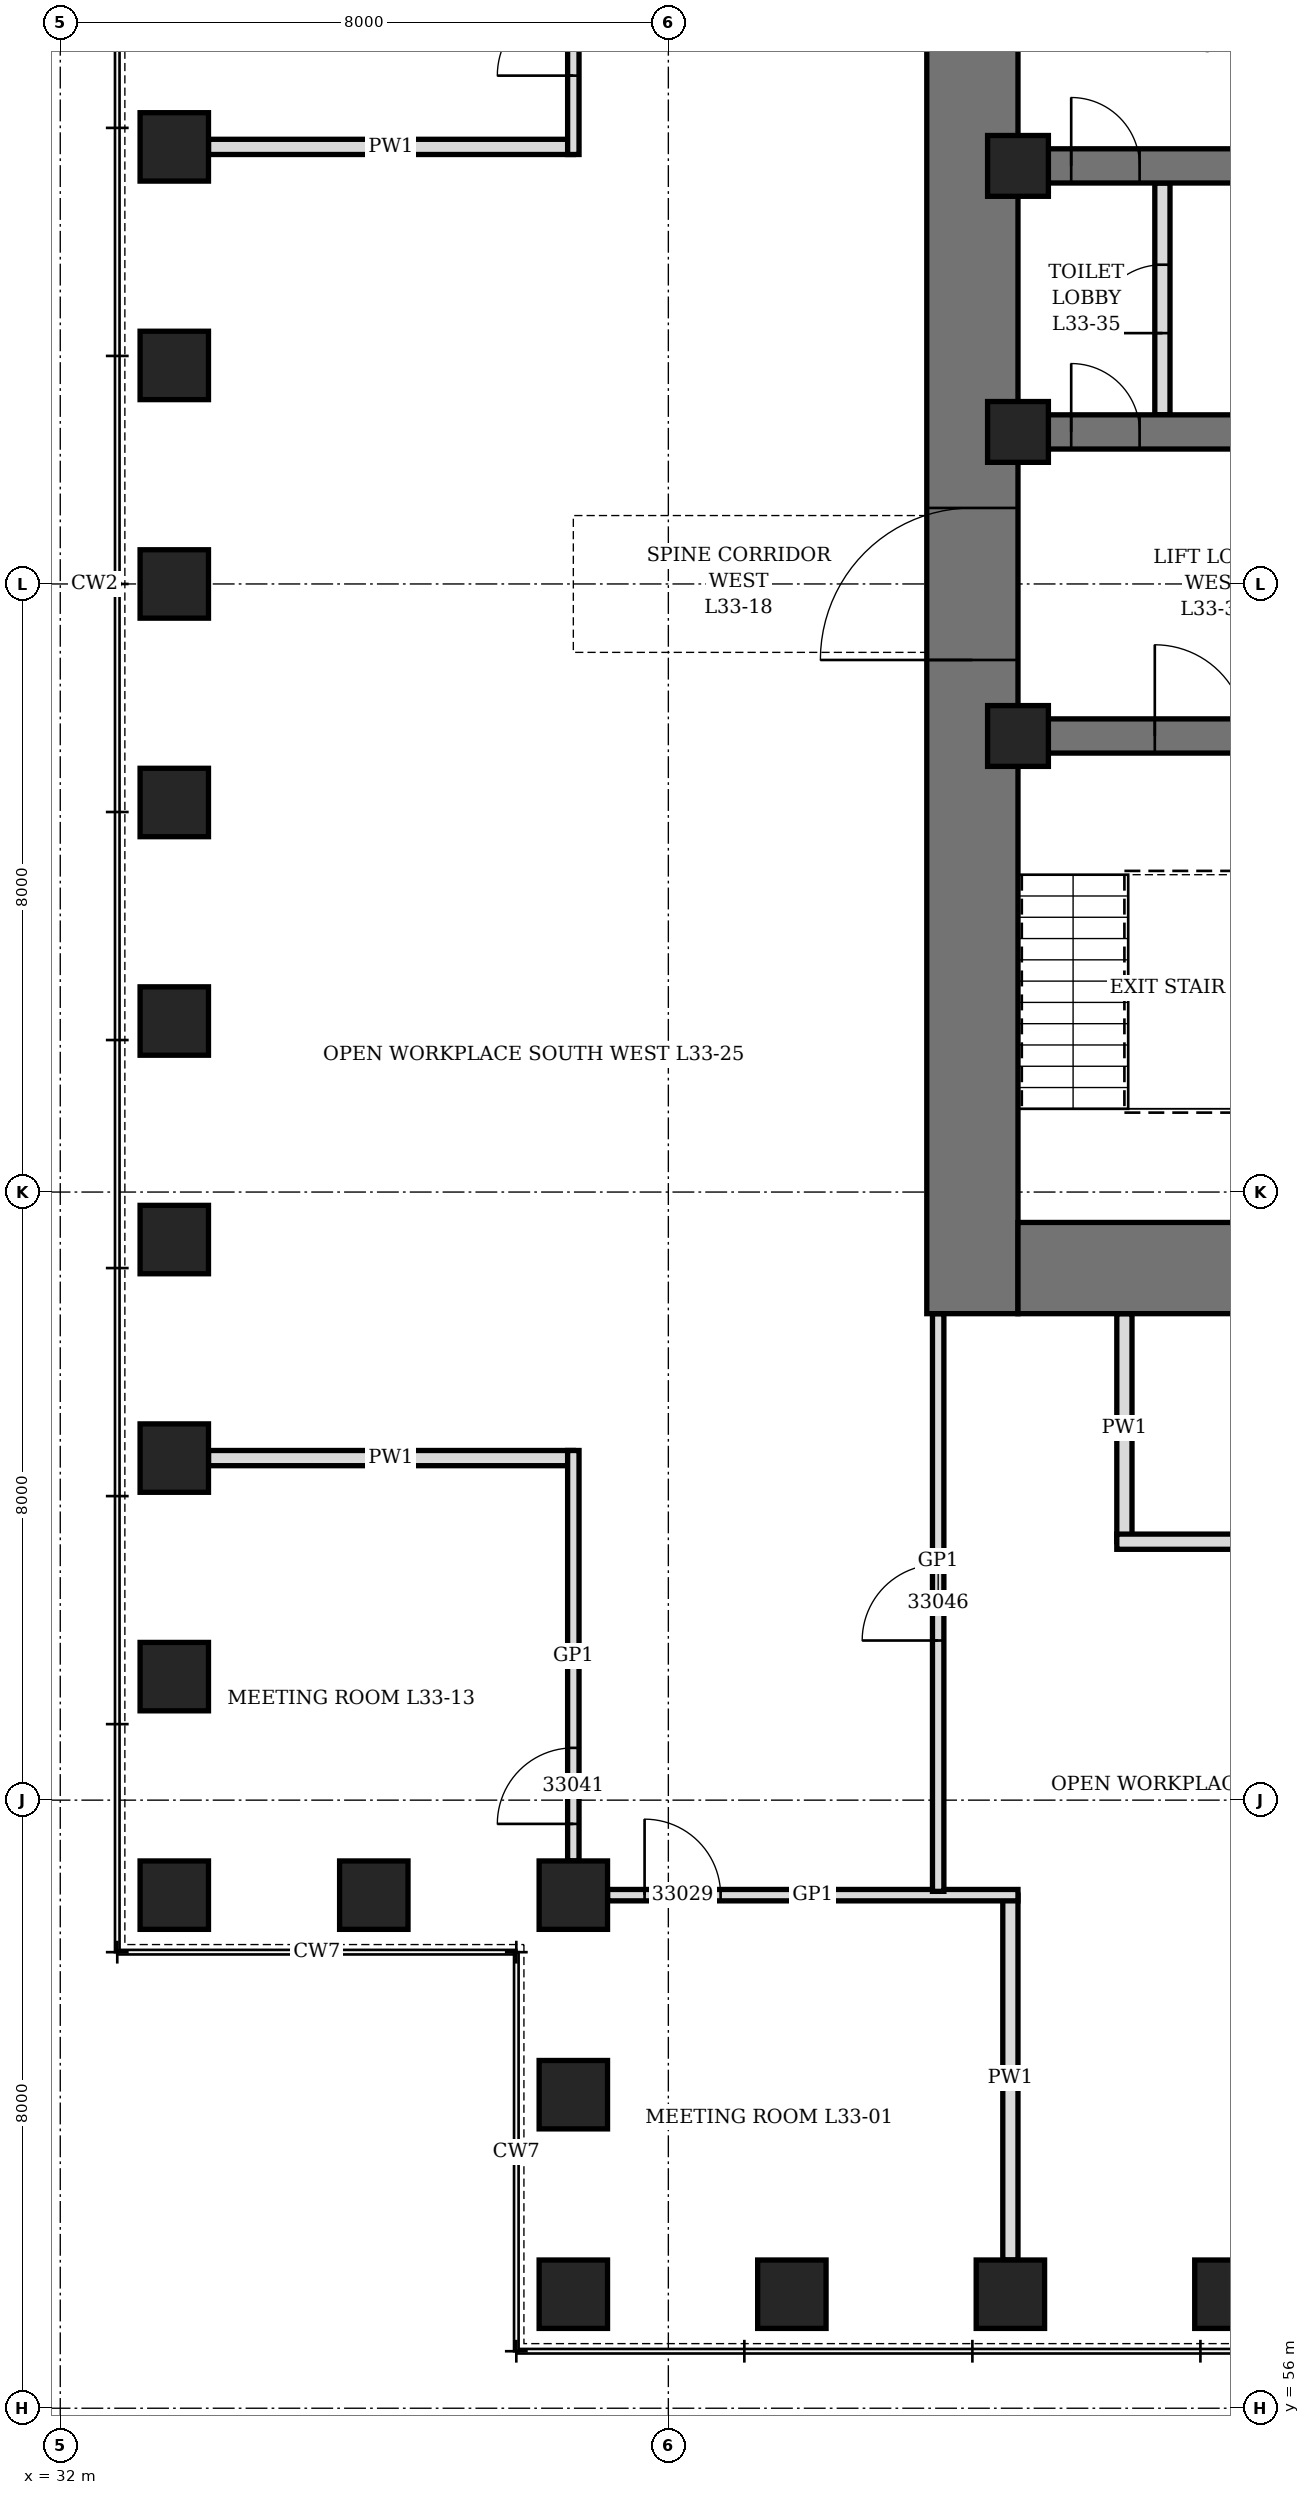
"""IFC4 building model, lengths in metres.
Left out: names, types, materials, properties, quantities, classifications, styles, units other than length and angle.
Written with IfcOpenShell. Run it as: python <this file> out.ifc"""

import sys

from ifc_helpers import new_model, si_unit, direction, frame, frame_2d, origin, origin_2d, place, context, subcontext, project, spatial, rectangle, hollow_rectangle, extrude, element, fill, save


model = new_model("IFC4")
c1 = context("Model", 3, precision=1e-05, world=origin(), true_north=direction((0.0, 1.0)))
c2 = subcontext(c1, "Body", "Model", "MODEL_VIEW")
j1 = project(units=[si_unit("LENGTHUNIT", "METRE"), si_unit("PLANEANGLEUNIT", "RADIAN")], contexts=[c1])
p1 = place(None, origin())
s1 = spatial("IfcSite", under=j1, at=p1, CompositionType="ELEMENT")
p2 = place(p1, origin())
s2 = spatial("IfcBuilding", under=s1, at=p2, CompositionType="ELEMENT")
p3 = place(p2, frame((0.0, 0.0, 150.1)))
s3 = spatial("IfcBuildingStorey", under=s2, at=p3, CompositionType="ELEMENT", Elevation=150.1)
for number, where, z_axis, x_axis in (
    (1, (38.75, 57.5, 0.0), (0.0, 0.0, 1.0), (1.0, 0.0, 0.0)),
    (2, (41.625, 57.5, 0.0), (0.0, 0.0, 1.0), (1.0, 0.0, 0.0)),
    (3, (44.5, 57.5, 0.0), (0.0, 0.0, 1.0), (1.0, 0.0, 0.0)),
    (4, (47.375, 57.5, 0.0), (0.0, 0.0, 1.0), (1.0, 0.0, 0.0)),
    (5, (33.5, 85.75, 0.0), (0.0, 0.0, 1.0), (0.0, 1.0, 0.0)),
    (6, (33.5, 82.875, 0.0), (0.0, 0.0, 1.0), (0.0, 1.0, 0.0)),
    (7, (33.5, 80.0, 0.0), (0.0, 0.0, 1.0), (0.0, 1.0, 0.0)),
    (8, (33.5, 77.125, 0.0), (0.0, 0.0, 1.0), (0.0, 1.0, 0.0)),
    (9, (33.5, 74.25, 0.0), (0.0, 0.0, 1.0), (0.0, 1.0, 0.0)),
    (10, (33.5, 71.375, 0.0), (0.0, 0.0, 1.0), (0.0, 1.0, 0.0)),
    (11, (33.5, 68.5, 0.0), (0.0, 0.0, 1.0), (0.0, 1.0, 0.0)),
    (12, (33.5, 65.625, 0.0), (0.0, 0.0, 1.0), (0.0, 1.0, 0.0)),
    (13, (33.5, 62.75, 0.0), (0.0, 0.0, 1.0), (1.0, 0.0, 0.0)),
    (14, (36.125, 62.75, 0.0), (0.0, 0.0, 1.0), (1.0, 0.0, 0.0)),
    (15, (38.75, 62.75, 0.0), (0.0, 0.0, 1.0), (0.0, 1.0, 0.0)),
    (16, (38.75, 60.125, 0.0), (0.0, 0.0, 1.0), (0.0, 1.0, 0.0)),
):
    element("IfcColumn", number, at=place(p3, frame(where, z_axis=z_axis, x_axis=x_axis)), inside=s3, PredefinedType="COLUMN", context=c2, shape_type="SweptSolid", body=[
        extrude(hollow_rectangle(XDim=0.9, YDim=0.9, WallThickness=0.12, at=origin_2d()), origin(), (0.0, 0.0, 1.0), 4.2),
    ])
p4 = place(p3, frame((44.0, 70.4, 0.0), z_axis=(0.0, 0.0, 1.0), x_axis=(0.0, 1.0, 0.0)))
e17 = element("IfcWall", 17, at=p4, inside=s3, PredefinedType="SHEAR", context=c2, shape_type="SweptSolid", body=[
    extrude(rectangle(XDim=19.2, YDim=1.2, at=frame_2d((9.6, 0.0))), origin(), (0.0, 0.0, 1.0), 4.2),
])
p5 = place(p4, frame((8.6, 0.0, 0.0)))
e18 = element("IfcOpeningElement", 18, at=p5, cuts=e17, PredefinedType="OPENING", context=c2, shape_type="SweptSolid", body=[
    extrude(rectangle(XDim=2.0, YDim=2.4, at=frame_2d((1.0, 1.2))), frame((0.0, 0.61, 0.0), z_axis=(0.0, -1.0, 0.0), x_axis=(1.0, 0.0, 0.0)), (0.0, 0.0, 1.0), 1.22),
])
p6 = place(p3, frame((44.6, 71.0, 0.0), z_axis=(0.0, 0.0, 1.0), x_axis=(1.0, 0.0, 0.0)))
e19 = element("IfcWall", 19, at=p6, inside=s3, PredefinedType="SHEAR", context=c2, shape_type="SweptSolid", body=[
    extrude(rectangle(XDim=22.8, YDim=1.2, at=frame_2d((11.4, 0.0))), origin(), (0.0, 0.0, 1.0), 4.2),
])
p7 = place(p3, frame((44.6, 78.0, 0.0), z_axis=(0.0, 0.0, 1.0), x_axis=(1.0, 0.0, 0.0)))
e20 = element("IfcWall", 20, at=p7, inside=s3, PredefinedType="SHEAR", context=c2, shape_type="SweptSolid", body=[
    extrude(rectangle(XDim=5.175, YDim=0.45, at=frame_2d((2.587, 0.0))), origin(), (0.0, 0.0, 1.0), 4.2),
])
p8 = place(p7, frame((1.8, 0.0, 0.0)))
e21 = element("IfcOpeningElement", 21, at=p8, cuts=e20, PredefinedType="OPENING", context=c2, shape_type="SweptSolid", body=[
    extrude(rectangle(XDim=1.2, YDim=2.1, at=frame_2d((0.6, 1.05))), frame((0.0, 0.235, 0.0), z_axis=(0.0, -1.0, 0.0), x_axis=(1.0, 0.0, 0.0)), (0.0, 0.0, 1.0), 0.47),
])
p9 = place(p3, frame((44.6, 82.0, 0.0), z_axis=(0.0, 0.0, 1.0), x_axis=(1.0, 0.0, 0.0)))
e22 = element("IfcWall", 22, at=p9, inside=s3, PredefinedType="SHEAR", context=c2, shape_type="SweptSolid", body=[
    extrude(rectangle(XDim=5.175, YDim=0.45, at=frame_2d((2.587, 0.0))), origin(), (0.0, 0.0, 1.0), 4.2),
])
p10 = place(p9, frame((0.7, 0.0, 0.0)))
e23 = element("IfcOpeningElement", 23, at=p10, cuts=e22, PredefinedType="OPENING", context=c2, shape_type="SweptSolid", body=[
    extrude(rectangle(XDim=0.9, YDim=2.1, at=frame_2d((0.45, 1.05))), frame((0.0, 0.235, 0.0), z_axis=(0.0, -1.0, 0.0), x_axis=(1.0, 0.0, 0.0)), (0.0, 0.0, 1.0), 0.47),
])
p11 = place(p3, frame((44.6, 85.5, 0.0), z_axis=(0.0, 0.0, 1.0), x_axis=(1.0, 0.0, 0.0)))
e24 = element("IfcWall", 24, at=p11, inside=s3, PredefinedType="SHEAR", context=c2, shape_type="SweptSolid", body=[
    extrude(rectangle(XDim=5.175, YDim=0.45, at=frame_2d((2.587, 0.0))), origin(), (0.0, 0.0, 1.0), 4.2),
])
p12 = place(p11, frame((0.7, 0.0, 0.0)))
e25 = element("IfcOpeningElement", 25, at=p12, cuts=e24, PredefinedType="OPENING", context=c2, shape_type="SweptSolid", body=[
    extrude(rectangle(XDim=0.9, YDim=2.1, at=frame_2d((0.45, 1.05))), frame((0.0, 0.235, 0.0), z_axis=(0.0, -1.0, 0.0), x_axis=(1.0, 0.0, 0.0)), (0.0, 0.0, 1.0), 0.47),
])
for number, where, z_axis, x_axis in (
    (26, (44.6, 78.0, 0.0), (0.0, 0.0, 1.0), (1.0, 0.0, 0.0)),
    (27, (44.6, 82.0, 0.0), (0.0, 0.0, 1.0), (1.0, 0.0, 0.0)),
    (28, (44.6, 85.5, 0.0), (0.0, 0.0, 1.0), (1.0, 0.0, 0.0)),
):
    element("IfcColumn", number, at=place(p3, frame(where, z_axis=z_axis, x_axis=x_axis)), inside=s3, PredefinedType="COLUMN", context=c2, shape_type="SweptSolid", body=[
        extrude(hollow_rectangle(XDim=0.8, YDim=0.8, WallThickness=0.1, at=origin_2d()), origin(), (0.0, 0.0, 1.0), 4.2),
    ])
p13 = place(p3, frame((46.5, 82.225, 0.0), z_axis=(0.0, 0.0, 1.0), x_axis=(0.0, 1.0, 0.0)))
e29 = element("IfcWall", 29, at=p13, inside=s3, PredefinedType="PARTITIONING", context=c2, shape_type="SweptSolid", body=[
    extrude(rectangle(XDim=3.05, YDim=0.2, at=frame_2d((1.525, 0.0))), origin(), (0.0, 0.0, 1.0), 4.04),
])
p14 = place(p13, frame((1.075, 0.0, 0.0)))
e30 = element("IfcOpeningElement", 30, at=p14, cuts=e29, PredefinedType="OPENING", context=c2, shape_type="SweptSolid", body=[
    extrude(rectangle(XDim=0.9, YDim=2.1, at=frame_2d((0.45, 1.05))), frame((0.0, 0.11, 0.0), z_axis=(0.0, -1.0, 0.0), x_axis=(1.0, 0.0, 0.0)), (0.0, 0.0, 1.0), 0.22),
])
p15 = place(p3, frame((44.5, 57.95, 0.0), z_axis=(0.0, 0.0, 1.0), x_axis=(0.0, 1.0, 0.0)))
e31 = element("IfcWall", 31, at=p15, inside=s3, PredefinedType="PARTITIONING", context=c2, shape_type="SweptSolid", body=[
    extrude(rectangle(XDim=4.8, YDim=0.2, at=frame_2d((2.4, 0.0))), origin(), (0.0, 0.0, 1.0), 2.74),
])
for number, where, z_axis, x_axis in (
    (32, (33.95, 68.5, 0.0), (0.0, 0.0, 1.0), (1.0, 0.0, 0.0)),
    (33, (33.95, 85.75, 0.0), (0.0, 0.0, 1.0), (1.0, 0.0, 0.0)),
):
    element("IfcWall", number, at=place(p3, frame(where, z_axis=z_axis, x_axis=x_axis)), inside=s3, PredefinedType="PARTITIONING", context=c2, shape_type="SweptSolid", body=[
        extrude(rectangle(XDim=4.8, YDim=0.2, at=frame_2d((2.4, 0.0))), origin(), (0.0, 0.0, 1.0), 3.428),
    ])
p16 = place(p3, frame((46.0, 67.4, 0.0), z_axis=(0.0, 0.0, 1.0), x_axis=(0.0, 1.0, 0.0)))
e34 = element("IfcWall", 34, at=p16, inside=s3, PredefinedType="PARTITIONING", context=c2, shape_type="SweptSolid", body=[
    extrude(rectangle(XDim=3.0, YDim=0.2, at=frame_2d((1.5, 0.0))), origin(), (0.0, 0.0, 1.0), 4.04),
])
p17 = place(p3, frame((39.2, 62.75, 0.0), z_axis=(0.0, 0.0, 1.0), x_axis=(1.0, 0.0, 0.0)))
e35 = element("IfcWall", 35, at=p17, inside=s3, PredefinedType="PARTITIONING", context=c2, shape_type="SweptSolid", body=[
    extrude(rectangle(XDim=5.4, YDim=0.15, at=frame_2d((2.7, 0.0))), origin(), (0.0, 0.0, 1.0), 4.04),
])
p18 = place(p17, frame((0.488, 0.0, 0.0)))
e36 = element("IfcOpeningElement", 36, at=p18, cuts=e35, PredefinedType="OPENING", context=c2, shape_type="SweptSolid", body=[
    extrude(rectangle(XDim=1.0, YDim=2.4, at=frame_2d((0.5, 1.2))), frame((0.0, 0.085, 0.0), z_axis=(0.0, -1.0, 0.0), x_axis=(1.0, 0.0, 0.0)), (0.0, 0.0, 1.0), 0.17),
])
p19 = place(p3, frame((45.9, 67.4, 0.0), z_axis=(0.0, 0.0, 1.0), x_axis=(1.0, 0.0, 0.0)))
e37 = element("IfcWall", 37, at=p19, inside=s3, PredefinedType="PARTITIONING", context=c2, shape_type="SweptSolid", body=[
    extrude(rectangle(XDim=6.2, YDim=0.2, at=frame_2d((3.1, 0.0))), origin(), (0.0, 0.0, 1.0), 4.04),
])
p20 = place(p19, frame((2.6, 0.0, 0.0)))
e38 = element("IfcOpeningElement", 38, at=p20, cuts=e37, PredefinedType="OPENING", context=c2, shape_type="SweptSolid", body=[
    extrude(rectangle(XDim=1.0, YDim=2.1, at=frame_2d((0.5, 1.05))), frame((0.0, 0.11, 0.0), z_axis=(0.0, -1.0, 0.0), x_axis=(1.0, 0.0, 0.0)), (0.0, 0.0, 1.0), 0.22),
])
p21 = place(p3, frame((38.75, 63.2, 0.0), z_axis=(0.0, 0.0, 1.0), x_axis=(0.0, 1.0, 0.0)))
e39 = element("IfcWall", 39, at=p21, inside=s3, PredefinedType="PARTITIONING", context=c2, shape_type="SweptSolid", body=[
    extrude(rectangle(XDim=5.4, YDim=0.15, at=frame_2d((2.7, 0.0))), origin(), (0.0, 0.0, 1.0), 4.04),
])
p22 = place(p21, frame((0.488, 0.0, 0.0)))
e40 = element("IfcOpeningElement", 40, at=p22, cuts=e39, PredefinedType="OPENING", context=c2, shape_type="SweptSolid", body=[
    extrude(rectangle(XDim=1.0, YDim=2.4, at=frame_2d((0.5, 1.2))), frame((0.0, 0.085, 0.0), z_axis=(0.0, -1.0, 0.0), x_axis=(1.0, 0.0, 0.0)), (0.0, 0.0, 1.0), 0.17),
])
p23 = place(p3, frame((38.75, 85.65, 0.0), z_axis=(0.0, 0.0, 1.0), x_axis=(0.0, 1.0, 0.0)))
e41 = element("IfcWall", 41, at=p23, inside=s3, PredefinedType="PARTITIONING", context=c2, shape_type="SweptSolid", body=[
    extrude(rectangle(XDim=11.15, YDim=0.15, at=frame_2d((5.575, 0.0))), origin(), (0.0, 0.0, 1.0), 4.04),
])
p24 = place(p23, frame((1.038, 0.0, 0.0)))
e42 = element("IfcOpeningElement", 42, at=p24, cuts=e41, PredefinedType="OPENING", context=c2, shape_type="SweptSolid", body=[
    extrude(rectangle(XDim=1.0, YDim=2.1, at=frame_2d((0.5, 1.05))), frame((0.0, 0.085, 0.0), z_axis=(0.0, -1.0, 0.0), x_axis=(1.0, 0.0, 0.0)), (0.0, 0.0, 1.0), 0.17),
])
p25 = place(p23, frame((6.788, 0.0, 0.0)))
e43 = element("IfcOpeningElement", 43, at=p25, cuts=e41, PredefinedType="OPENING", context=c2, shape_type="SweptSolid", body=[
    extrude(rectangle(XDim=1.0, YDim=2.4, at=frame_2d((0.5, 1.2))), frame((0.0, 0.085, 0.0), z_axis=(0.0, -1.0, 0.0), x_axis=(1.0, 0.0, 0.0)), (0.0, 0.0, 1.0), 0.17),
])
p26 = place(p3, frame((43.55, 62.8, 0.0), z_axis=(0.0, 0.0, 1.0), x_axis=(0.0, 1.0, 0.0)))
e44 = element("IfcWall", 44, at=p26, inside=s3, PredefinedType="PARTITIONING", context=c2, shape_type="SweptSolid", body=[
    extrude(rectangle(XDim=7.6, YDim=0.15, at=frame_2d((3.8, 0.0))), origin(), (0.0, 0.0, 1.0), 4.04),
])
p27 = place(p26, frame((3.3, 0.0, 0.0)))
e45 = element("IfcOpeningElement", 45, at=p27, cuts=e44, PredefinedType="OPENING", context=c2, shape_type="SweptSolid", body=[
    extrude(rectangle(XDim=1.0, YDim=2.4, at=frame_2d((0.5, 1.2))), frame((0.0, 0.085, 0.0), z_axis=(0.0, -1.0, 0.0), x_axis=(1.0, 0.0, 0.0)), (0.0, 0.0, 1.0), 0.17),
])
p28 = place(p10, origin())
e46 = element("IfcDoor", 46, at=p28, inside=s3, OperationType="SINGLE_SWING_LEFT", PredefinedType="DOOR", context=c2, shape_type="SweptSolid", body=[
    extrude(rectangle(XDim=0.9, YDim=2.1, at=frame_2d((0.45, 1.05))), frame((0.0, 0.225, 0.0), z_axis=(0.0, -1.0, 0.0), x_axis=(1.0, 0.0, 0.0)), (0.0, 0.0, 1.0), 0.449),
])
fill(e23, e46)
p29 = place(p14, origin())
e47 = element("IfcDoor", 47, at=p29, inside=s3, OperationType="SINGLE_SWING_RIGHT", PredefinedType="DOOR", context=c2, shape_type="SweptSolid", body=[
    extrude(rectangle(XDim=0.9, YDim=2.1, at=frame_2d((0.45, 1.05))), frame((0.0, 0.1, 0.0), z_axis=(0.0, -1.0, 0.0), x_axis=(1.0, 0.0, 0.0)), (0.0, 0.0, 1.0), 0.199),
])
fill(e30, e47)
p30 = place(p12, origin())
e48 = element("IfcDoor", 48, at=p30, inside=s3, OperationType="SINGLE_SWING_RIGHT", PredefinedType="DOOR", context=c2, shape_type="SweptSolid", body=[
    extrude(rectangle(XDim=0.9, YDim=2.1, at=frame_2d((0.45, 1.05))), frame((0.0, 0.225, 0.0), z_axis=(0.0, -1.0, 0.0), x_axis=(1.0, 0.0, 0.0)), (0.0, 0.0, 1.0), 0.449),
])
fill(e25, e48)
p31 = place(p8, origin())
e49 = element("IfcDoor", 49, at=p31, inside=s3, OperationType="SINGLE_SWING_LEFT", PredefinedType="DOOR", context=c2, shape_type="SweptSolid", body=[
    extrude(rectangle(XDim=1.2, YDim=2.1, at=frame_2d((0.6, 1.05))), frame((0.0, 0.225, 0.0), z_axis=(0.0, -1.0, 0.0), x_axis=(1.0, 0.0, 0.0)), (0.0, 0.0, 1.0), 0.449),
])
fill(e21, e49)
p32 = place(p5, origin())
e50 = element("IfcDoor", 50, at=p32, inside=s3, OperationType="DOUBLE_DOOR_SINGLE_SWING", PredefinedType="DOOR", context=c2, shape_type="SweptSolid", body=[
    extrude(rectangle(XDim=2.0, YDim=2.4, at=frame_2d((1.0, 1.2))), frame((0.0, 0.35, 0.0), z_axis=(0.0, -1.0, 0.0), x_axis=(1.0, 0.0, 0.0)), (0.0, 0.0, 1.0), 0.7),
])
fill(e18, e50)
p33 = place(p18, origin())
e51 = element("IfcDoor", 51, at=p33, inside=s3, OperationType="SINGLE_SWING_RIGHT", PredefinedType="DOOR", context=c2, shape_type="SweptSolid", body=[
    extrude(rectangle(XDim=1.0, YDim=2.4, at=frame_2d((0.5, 1.2))), frame((0.0, 0.075, 0.0), z_axis=(0.0, -1.0, 0.0), x_axis=(1.0, 0.0, 0.0)), (0.0, 0.0, 1.0), 0.149),
])
fill(e36, e51)
p34 = place(p22, origin())
e52 = element("IfcDoor", 52, at=p34, inside=s3, OperationType="SINGLE_SWING_RIGHT", PredefinedType="DOOR", context=c2, shape_type="SweptSolid", body=[
    extrude(rectangle(XDim=1.0, YDim=2.4, at=frame_2d((0.5, 1.2))), frame((0.0, 0.075, 0.0), z_axis=(0.0, -1.0, 0.0), x_axis=(1.0, 0.0, 0.0)), (0.0, 0.0, 1.0), 0.149),
])
fill(e40, e52)
p35 = place(p24, origin())
e53 = element("IfcDoor", 53, at=p35, inside=s3, OperationType="SINGLE_SWING_LEFT", PredefinedType="DOOR", context=c2, shape_type="SweptSolid", body=[
    extrude(rectangle(XDim=1.0, YDim=2.1, at=frame_2d((0.5, 1.05))), frame((0.0, 0.075, 0.0), z_axis=(0.0, -1.0, 0.0), x_axis=(1.0, 0.0, 0.0)), (0.0, 0.0, 1.0), 0.149),
])
fill(e42, e53)
p36 = place(p27, origin())
e54 = element("IfcDoor", 54, at=p36, inside=s3, OperationType="SINGLE_SWING_RIGHT", PredefinedType="DOOR", context=c2, shape_type="SweptSolid", body=[
    extrude(rectangle(XDim=1.0, YDim=2.4, at=frame_2d((0.5, 1.2))), frame((0.0, 0.075, 0.0), z_axis=(0.0, -1.0, 0.0), x_axis=(1.0, 0.0, 0.0)), (0.0, 0.0, 1.0), 0.149),
])
fill(e45, e54)
save(model, sys.argv[1])
